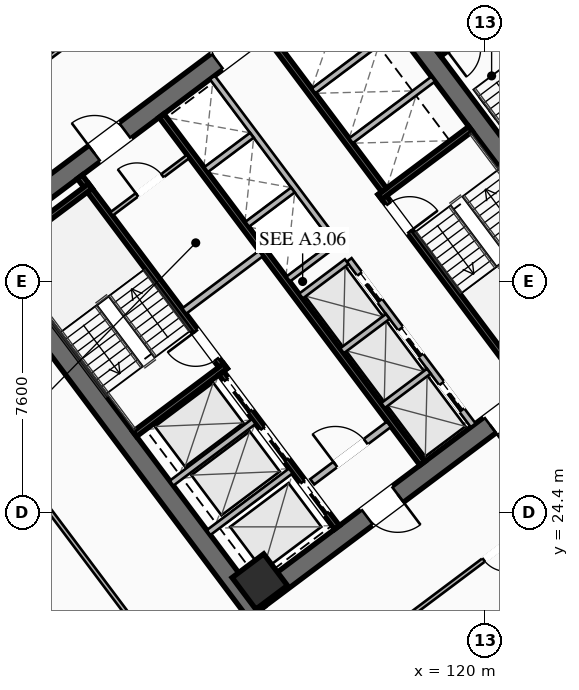
"""IFC4 building model, lengths in metres.
Left out: names, types, materials, properties, quantities, classifications, styles, units other than length and angle.
Written with IfcOpenShell. Run it as: python <this file> out.ifc"""

import sys

from ifc_helpers import new_model, si_unit, direction, frame, frame_2d, origin, origin_2d, place, context, subcontext, project, spatial, rectangle, hollow_rectangle, extrude, element, fill, save


model = new_model("IFC4")
c1 = context("Model", 3, precision=1e-05, world=origin(), true_north=direction((0.0, 1.0)))
c2 = subcontext(c1, "Body", "Model", "MODEL_VIEW")
j1 = project(units=[si_unit("LENGTHUNIT", "METRE"), si_unit("PLANEANGLEUNIT", "RADIAN")], contexts=[c1])
p1 = place(None, origin())
s1 = spatial("IfcSite", under=j1, at=p1, CompositionType="ELEMENT")
p2 = place(p1, origin())
s2 = spatial("IfcBuilding", under=s1, at=p2, CompositionType="ELEMENT")
p3 = place(p2, frame((0.0, 0.0, 63.65)))
s3 = spatial("IfcBuildingStorey", under=s2, at=p3, CompositionType="ELEMENT", Elevation=63.65)
for number, where, z_axis, x_axis in (
    (1, (112.476, 21.107, 0.0), (0.0, 0.0, 1.0), (-0.6, 0.8, 0.0)),
    (2, (115.524, 42.893, 0.0), (0.0, 0.0, 1.0), (0.6, -0.8, 0.0)),
):
    element("IfcWall", number, at=place(p3, frame(where, z_axis=z_axis, x_axis=x_axis)), inside=s3, PredefinedType="SHEAR", context=c2, shape_type="SweptSolid", body=[
        extrude(rectangle(XDim=15.6, YDim=0.65, at=frame_2d((7.8, 0.0))), origin(), (0.0, 0.0, 1.0), 3.55),
    ])
p4 = place(p3, frame((124.429, 30.478, 0.0), z_axis=(0.0, 0.0, 1.0), x_axis=(-0.799998028465, -0.600002628705, 0.0)))
e3 = element("IfcWall", 3, at=p4, inside=s3, PredefinedType="SHEAR", context=c2, shape_type="SweptSolid", body=[
    extrude(rectangle(XDim=14.86, YDim=0.65, at=frame_2d((7.43, 0.0))), origin(), (0.0, 0.0, 1.0), 3.55),
])
p5 = place(p4, frame((9.13, 0.0, 0.0)))
e4 = element("IfcOpeningElement", 4, at=p5, cuts=e3, PredefinedType="OPENING", context=c2, shape_type="SweptSolid", body=[
    extrude(rectangle(XDim=1.25, YDim=2.25, at=frame_2d((0.625, 1.125))), frame((0.0, 0.335, 0.0), z_axis=(0.0, -1.0, 0.0), x_axis=(1.0, 0.0, 0.0)), (0.0, 0.0, 1.0), 0.67),
])
p6 = place(p4, frame((4.08, 0.0, 0.0)))
e5 = element("IfcOpeningElement", 5, at=p6, cuts=e3, PredefinedType="OPENING", context=c2, shape_type="SweptSolid", body=[
    extrude(rectangle(XDim=1.25, YDim=2.25, at=frame_2d((0.625, 1.125))), frame((0.0, 0.335, 0.0), z_axis=(0.0, -1.0, 0.0), x_axis=(1.0, 0.0, 0.0)), (0.0, 0.0, 1.0), 0.67),
])
p7 = place(p3, frame((103.571, 33.522, 0.0), z_axis=(0.0, 0.0, 1.0), x_axis=(0.799998028465, 0.600002628705, 0.0)))
e6 = element("IfcWall", 6, at=p7, inside=s3, PredefinedType="SHEAR", context=c2, shape_type="SweptSolid", body=[
    extrude(rectangle(XDim=14.86, YDim=0.65, at=frame_2d((7.43, 0.0))), origin(), (0.0, 0.0, 1.0), 3.55),
])
p8 = place(p7, frame((4.48, 0.0, 0.0)))
e7 = element("IfcOpeningElement", 7, at=p8, cuts=e6, PredefinedType="OPENING", context=c2, shape_type="SweptSolid", body=[
    extrude(rectangle(XDim=1.25, YDim=2.25, at=frame_2d((0.625, 1.125))), frame((0.0, 0.335, 0.0), z_axis=(0.0, -1.0, 0.0), x_axis=(1.0, 0.0, 0.0)), (0.0, 0.0, 1.0), 0.67),
])
p9 = place(p7, frame((9.53, 0.0, 0.0)))
e8 = element("IfcOpeningElement", 8, at=p9, cuts=e6, PredefinedType="OPENING", context=c2, shape_type="SweptSolid", body=[
    extrude(rectangle(XDim=1.25, YDim=2.25, at=frame_2d((0.625, 1.125))), frame((0.0, 0.335, 0.0), z_axis=(0.0, -1.0, 0.0), x_axis=(1.0, 0.0, 0.0)), (0.0, 0.0, 1.0), 0.67),
])
p10 = place(p3, frame((112.59, 22.13, 0.0), z_axis=(0.0, 0.0, 1.0), x_axis=(0.799999996291, 0.600000004945, 0.0)))
e9 = element("IfcColumn", 9, at=p10, inside=s3, PredefinedType="COLUMN", context=c2, shape_type="SweptSolid", body=[
    extrude(hollow_rectangle(XDim=1.3, YDim=1.3, WallThickness=0.05, at=origin_2d()), origin(), (0.0, 0.0, 1.0), 3.35),
])
p11 = place(p3, frame((111.44, 29.08, 0.0), z_axis=(0.0, 0.0, 1.0), x_axis=(-0.600009827119, 0.799992629566, 0.0)))
e10 = element("IfcWall", 10, at=p11, inside=s3, PredefinedType="SHEAR", context=c2, shape_type="SweptSolid", body=[
    extrude(rectangle(XDim=7.95, YDim=0.2, at=frame_2d((3.975, 0.0))), origin(), (0.0, 0.0, 1.0), 3.35),
])
p12 = place(p11, frame((0.45, 0.0, 0.0)))
e11 = element("IfcOpeningElement", 11, at=p12, cuts=e10, PredefinedType="OPENING", context=c2, shape_type="SweptSolid", body=[
    extrude(rectangle(XDim=1.15, YDim=2.2, at=frame_2d((0.575, 1.1))), frame((0.0, 0.11, 0.0), z_axis=(0.0, -1.0, 0.0), x_axis=(1.0, 0.0, 0.0)), (0.0, 0.0, 1.0), 0.22),
])
for number, where, z_axis, x_axis in (
    (12, (108.476, 26.982, 0.0), (0.0, 0.0, 1.0), (0.8, 0.6, 0.0)),
    (13, (104.036, 32.902, 0.0), (0.0, 0.0, 1.0), (0.8, 0.6, 0.0)),
):
    element("IfcWall", number, at=place(p3, frame(where, z_axis=z_axis, x_axis=x_axis)), inside=s3, PredefinedType="SHEAR", context=c2, shape_type="SweptSolid", body=[
        extrude(rectangle(XDim=3.73, YDim=0.2, at=frame_2d((1.865, 0.0))), origin(), (0.0, 0.0, 1.0), 3.35),
    ])
p13 = place(p3, frame((116.56, 34.92, 0.0), z_axis=(0.0, 0.0, 1.0), x_axis=(0.600009827119, -0.799992629566, 0.0)))
e14 = element("IfcWall", 14, at=p13, inside=s3, PredefinedType="SHEAR", context=c2, shape_type="SweptSolid", body=[
    extrude(rectangle(XDim=7.95, YDim=0.2, at=frame_2d((3.975, 0.0))), origin(), (0.0, 0.0, 1.0), 3.35),
])
p14 = place(p13, frame((0.45, 0.0, 0.0)))
e15 = element("IfcOpeningElement", 15, at=p14, cuts=e14, PredefinedType="OPENING", context=c2, shape_type="SweptSolid", body=[
    extrude(rectangle(XDim=1.15, YDim=2.2, at=frame_2d((0.575, 1.1))), frame((0.0, 0.11, 0.0), z_axis=(0.0, -1.0, 0.0), x_axis=(1.0, 0.0, 0.0)), (0.0, 0.0, 1.0), 0.22),
])
p15 = place(p3, frame((116.54, 34.78, 0.0), z_axis=(0.0, 0.0, 1.0), x_axis=(0.799984290658, 0.600020945218, 0.0)))
e16 = element("IfcWall", 16, at=p15, inside=s3, PredefinedType="SHEAR", context=c2, shape_type="SweptSolid", body=[
    extrude(rectangle(XDim=3.73, YDim=0.2, at=frame_2d((1.865, 0.0))), origin(), (0.0, 0.0, 1.0), 3.35),
])
p16 = place(p3, frame((117.938, 26.016, 0.0), z_axis=(0.0, 0.0, 1.0), x_axis=(-0.600005463273, 0.799995902516, 0.0)))
e17 = element("IfcWall", 17, at=p16, inside=s3, PredefinedType="SHEAR", context=c2, shape_type="SweptSolid", body=[
    extrude(rectangle(XDim=14.3, YDim=0.2, at=frame_2d((7.15, 0.0))), origin(), (0.0, 0.0, 1.0), 3.35),
])
p17 = place(p3, frame((110.104, 31.028, 0.0), z_axis=(0.0, 0.0, 1.0), x_axis=(0.800018601094, 0.59997519774, 0.0)))
e18 = element("IfcWall", 18, at=p17, inside=s3, PredefinedType="SOLIDWALL", context=c2, shape_type="SweptSolid", body=[
    extrude(rectangle(XDim=3.15, YDim=0.22, at=frame_2d((1.575, 0.0))), origin(), (0.0, 0.0, 1.0), 2.493),
])
p18 = place(p3, frame((114.316, 25.412, 0.0), z_axis=(0.0, 0.0, 1.0), x_axis=(0.800018601094, 0.59997519774, 0.0)))
e19 = element("IfcWall", 19, at=p18, inside=s3, PredefinedType="SOLIDWALL", context=c2, shape_type="SweptSolid", body=[
    extrude(rectangle(XDim=3.15, YDim=0.22, at=frame_2d((1.575, 0.0))), origin(), (0.0, 0.0, 1.0), 2.493),
])
p19 = place(p18, frame((0.95, 0.0, 0.0)))
e20 = element("IfcOpeningElement", 20, at=p19, cuts=e19, PredefinedType="OPENING", context=c2, shape_type="SweptSolid", body=[
    extrude(rectangle(XDim=1.25, YDim=2.25, at=frame_2d((0.625, 1.125))), frame((0.0, 0.12, 0.0), z_axis=(0.0, -1.0, 0.0), x_axis=(1.0, 0.0, 0.0)), (0.0, 0.0, 1.0), 0.24),
])
p20 = place(p3, frame((115.13, 23.91, 0.0), z_axis=(0.0, 0.0, 1.0), x_axis=(-0.599975393228, 0.800018454488, 0.0)))
e21 = element("IfcWall", 21, at=p20, inside=s3, PredefinedType="SHEAR", context=c2, shape_type="SweptSolid", body=[
    extrude(rectangle(XDim=6.35, YDim=0.2, at=frame_2d((3.175, 0.0))), origin(), (0.0, 0.0, 1.0), 3.35),
])
p21 = place(p20, frame((4.775, 0.0, 0.0)))
e22 = element("IfcOpeningElement", 22, at=p21, cuts=e21, PredefinedType="OPENING", context=c2, shape_type="SweptSolid", body=[
    extrude(rectangle(XDim=1.3, YDim=2.25, at=frame_2d((0.65, 1.125))), frame((0.0, 0.11, 0.0), z_axis=(0.0, -1.0, 0.0), x_axis=(1.0, 0.0, 0.0)), (0.0, 0.0, 1.0), 0.22),
])
p22 = place(p20, frame((2.775, 0.0, 0.0)))
e23 = element("IfcOpeningElement", 23, at=p22, cuts=e21, PredefinedType="OPENING", context=c2, shape_type="SweptSolid", body=[
    extrude(rectangle(XDim=1.3, YDim=2.25, at=frame_2d((0.65, 1.125))), frame((0.0, 0.11, 0.0), z_axis=(0.0, -1.0, 0.0), x_axis=(1.0, 0.0, 0.0)), (0.0, 0.0, 1.0), 0.22),
])
p23 = place(p20, frame((0.575, 0.0, 0.0)))
e24 = element("IfcOpeningElement", 24, at=p23, cuts=e21, PredefinedType="OPENING", context=c2, shape_type="SweptSolid", body=[
    extrude(rectangle(XDim=1.3, YDim=2.25, at=frame_2d((0.65, 1.125))), frame((0.0, 0.11, 0.0), z_axis=(0.0, -1.0, 0.0), x_axis=(1.0, 0.0, 0.0)), (0.0, 0.0, 1.0), 0.22),
])
for number, where, z_axis, x_axis in (
    (25, (110.906, 23.742, 0.0), (0.0, 0.0, 1.0), (0.8, 0.6, 0.0)),
    (26, (109.688, 25.366, 0.0), (0.0, 0.0, 1.0), (0.8, 0.6, 0.0)),
):
    element("IfcWall", number, at=place(p3, frame(where, z_axis=z_axis, x_axis=x_axis)), inside=s3, PredefinedType="SOLIDWALL", context=c2, shape_type="SweptSolid", body=[
        extrude(rectangle(XDim=3.38, YDim=0.2, at=frame_2d((1.69, 0.0))), origin(), (0.0, 0.0, 1.0), 3.35),
    ])
p24 = place(p3, frame((112.87, 40.09, 0.0), z_axis=(0.0, 0.0, 1.0), x_axis=(0.599975393228, -0.800018454488, 0.0)))
e27 = element("IfcWall", 27, at=p24, inside=s3, PredefinedType="SHEAR", context=c2, shape_type="SweptSolid", body=[
    extrude(rectangle(XDim=6.35, YDim=0.2, at=frame_2d((3.175, 0.0))), origin(), (0.0, 0.0, 1.0), 3.35),
])
for number, where, z_axis, x_axis in (
    (28, (115.59, 36.63, 0.0), (0.0, 0.0, 1.0), (0.8, 0.6, 0.0)),
    (29, (114.36, 38.27, 0.0), (0.0, 0.0, 1.0), (0.8, 0.6, 0.0)),
):
    element("IfcWall", number, at=place(p3, frame(where, z_axis=z_axis, x_axis=x_axis)), inside=s3, PredefinedType="SOLIDWALL", context=c2, shape_type="SweptSolid", body=[
        extrude(rectangle(XDim=3.38, YDim=0.2, at=frame_2d((1.69, 0.0))), origin(), (0.0, 0.0, 1.0), 3.35),
    ])
p25 = place(p3, frame((107.71, 34.22, 0.0), z_axis=(0.0, 0.0, 1.0), x_axis=(0.799981399002, 0.60002480053, 0.0)))
e30 = element("IfcWall", 30, at=p25, inside=s3, PredefinedType="PARTITIONING", context=c2, shape_type="SweptSolid", body=[
    extrude(rectangle(XDim=3.15, YDim=0.135, at=frame_2d((1.575, 0.0))), origin(), (0.0, 0.0, 1.0), 2.493),
])
p26 = place(p25, frame((1.05, 0.0, 0.0)))
e31 = element("IfcOpeningElement", 31, at=p26, cuts=e30, PredefinedType="OPENING", context=c2, shape_type="SweptSolid", body=[
    extrude(rectangle(XDim=1.05, YDim=2.2, at=frame_2d((0.525, 1.1))), frame((0.0, 0.077, 0.0), z_axis=(0.0, -1.0, 0.0), x_axis=(1.0, 0.0, 0.0)), (0.0, 0.0, 1.0), 0.155),
])
p27 = place(p3, frame((119.61, 27.27, 0.0), z_axis=(0.0, 0.0, 1.0), x_axis=(-0.600011488909, 0.79999138319, 0.0)))
e32 = element("IfcWall", 32, at=p27, inside=s3, PredefinedType="SOLIDWALL", context=c2, shape_type="SweptSolid", body=[
    extrude(rectangle(XDim=6.8, YDim=0.2, at=frame_2d((3.4, 0.0))), origin(), (0.0, 0.0, 1.0), 3.35),
])
p28 = place(p27, frame((0.625, 0.0, 0.0)))
e33 = element("IfcOpeningElement", 33, at=p28, cuts=e32, PredefinedType="OPENING", context=c2, shape_type="SweptSolid", body=[
    extrude(rectangle(XDim=1.1, YDim=2.2, at=frame_2d((0.55, 1.1))), frame((0.0, 0.11, 0.0), z_axis=(0.0, -1.0, 0.0), x_axis=(1.0, 0.0, 0.0)), (0.0, 0.0, 1.0), 0.22),
])
p29 = place(p27, frame((2.875, 0.0, 0.0)))
e34 = element("IfcOpeningElement", 34, at=p29, cuts=e32, PredefinedType="OPENING", context=c2, shape_type="SweptSolid", body=[
    extrude(rectangle(XDim=1.1, YDim=2.2, at=frame_2d((0.55, 1.1))), frame((0.0, 0.11, 0.0), z_axis=(0.0, -1.0, 0.0), x_axis=(1.0, 0.0, 0.0)), (0.0, 0.0, 1.0), 0.22),
])
p30 = place(p27, frame((5.125, 0.0, 0.0)))
e35 = element("IfcOpeningElement", 35, at=p30, cuts=e32, PredefinedType="OPENING", context=c2, shape_type="SweptSolid", body=[
    extrude(rectangle(XDim=1.1, YDim=2.2, at=frame_2d((0.55, 1.1))), frame((0.0, 0.11, 0.0), z_axis=(0.0, -1.0, 0.0), x_axis=(1.0, 0.0, 0.0)), (0.0, 0.0, 1.0), 0.22),
])
p31 = place(p3, frame((116.646, 27.922, 0.0), z_axis=(0.0, 0.0, 1.0), x_axis=(0.8, 0.6, 0.0)))
e36 = element("IfcWall", 36, at=p31, inside=s3, PredefinedType="SOLIDWALL", context=c2, shape_type="SweptSolid", body=[
    extrude(rectangle(XDim=1.88, YDim=0.2, at=frame_2d((0.94, 0.0))), origin(), (0.0, 0.0, 1.0), 3.35),
])
p32 = place(p3, frame((115.296, 29.722, 0.0), z_axis=(0.0, 0.0, 1.0), x_axis=(0.799984418148, 0.600020775241, 0.0)))
e37 = element("IfcWall", 37, at=p32, inside=s3, PredefinedType="SOLIDWALL", context=c2, shape_type="SweptSolid", body=[
    extrude(rectangle(XDim=1.88, YDim=0.2, at=frame_2d((0.94, 0.0))), origin(), (0.0, 0.0, 1.0), 3.35),
])
p33 = place(p3, frame((113.946, 31.522, 0.0), z_axis=(0.0, 0.0, 1.0), x_axis=(0.8, 0.6, 0.0)))
e38 = element("IfcWall", 38, at=p33, inside=s3, PredefinedType="SOLIDWALL", context=c2, shape_type="SweptSolid", body=[
    extrude(rectangle(XDim=1.88, YDim=0.2, at=frame_2d((0.94, 0.0))), origin(), (0.0, 0.0, 1.0), 3.35),
])
p34 = place(p3, frame((115.11, 33.27, 0.0), z_axis=(0.0, 0.0, 1.0), x_axis=(-0.600011488909, 0.79999138319, 0.0)))
e39 = element("IfcWall", 39, at=p34, inside=s3, PredefinedType="SOLIDWALL", context=c2, shape_type="SweptSolid", body=[
    extrude(rectangle(XDim=6.8, YDim=0.2, at=frame_2d((3.4, 0.0))), origin(), (0.0, 0.0, 1.0), 3.35),
])
p35 = place(p3, frame((113.526, 32.082, 0.0), z_axis=(0.0, 0.0, 1.0), x_axis=(0.800046745961, 0.599937666993, 0.0)))
e40 = element("IfcWall", 40, at=p35, inside=s3, PredefinedType="SOLIDWALL", context=c2, shape_type="SweptSolid", body=[
    extrude(rectangle(XDim=1.88, YDim=0.2, at=frame_2d((0.94, 0.0))), origin(), (0.0, 0.0, 1.0), 3.35),
])
p36 = place(p3, frame((112.176, 33.882, 0.0), z_axis=(0.0, 0.0, 1.0), x_axis=(0.8, 0.6, 0.0)))
e41 = element("IfcWall", 41, at=p36, inside=s3, PredefinedType="SOLIDWALL", context=c2, shape_type="SweptSolid", body=[
    extrude(rectangle(XDim=1.88, YDim=0.2, at=frame_2d((0.94, 0.0))), origin(), (0.0, 0.0, 1.0), 3.35),
])
p37 = place(p3, frame((110.826, 35.682, 0.0), z_axis=(0.0, 0.0, 1.0), x_axis=(0.799984418148, 0.600020775241, 0.0)))
e42 = element("IfcWall", 42, at=p37, inside=s3, PredefinedType="SOLIDWALL", context=c2, shape_type="SweptSolid", body=[
    extrude(rectangle(XDim=1.88, YDim=0.2, at=frame_2d((0.94, 0.0))), origin(), (0.0, 0.0, 1.0), 3.35),
])
p38 = place(p3, frame((121.204, 41.528, 0.0), z_axis=(0.0, 0.0, 1.0), x_axis=(-0.800017232136, -0.599977023131, 0.0)))
e43 = element("IfcWall", 43, at=p38, inside=s3, PredefinedType="SHEAR", context=c2, shape_type="SweptSolid", body=[
    extrude(rectangle(XDim=3.4, YDim=0.2, at=frame_2d((1.7, 0.0))), origin(), (0.0, 0.0, 1.0), 3.35),
])
p39 = place(p38, frame((1.975, 0.0, 0.0)))
e44 = element("IfcOpeningElement", 44, at=p39, cuts=e43, PredefinedType="OPENING", context=c2, shape_type="SweptSolid", body=[
    extrude(rectangle(XDim=1.15, YDim=2.2, at=frame_2d((0.575, 1.1))), frame((0.0, 0.11, 0.0), z_axis=(0.0, -1.0, 0.0), x_axis=(1.0, 0.0, 0.0)), (0.0, 0.0, 1.0), 0.22),
])
p40 = place(p3, frame((98.516, 34.012, 0.0), z_axis=(0.0, 0.0, 1.0), x_axis=(0.799998035726, 0.600002619023, 0.0)))
e45 = element("IfcWall", 45, at=p40, inside=s3, PredefinedType="PARTITIONING", context=c2, shape_type="SweptSolid", body=[
    extrude(rectangle(XDim=29.83, YDim=0.135, at=frame_2d((14.915, 0.0))), origin(), (0.0, 0.0, 1.0), 2.493),
])
p41 = place(p40, frame((1.587, 0.0, 0.0)))
e46 = element("IfcOpeningElement", 46, at=p41, cuts=e45, PredefinedType="OPENING", context=c2, shape_type="SweptSolid", body=[
    extrude(rectangle(XDim=0.95, YDim=2.05, at=frame_2d((0.475, 1.025))), frame((0.0, 0.077, 0.0), z_axis=(0.0, -1.0, 0.0), x_axis=(1.0, 0.0, 0.0)), (0.0, 0.0, 1.0), 0.155),
])
p42 = place(p40, frame((28.58, 0.0, 0.0)))
e47 = element("IfcOpeningElement", 47, at=p42, cuts=e45, PredefinedType="OPENING", context=c2, shape_type="SweptSolid", body=[
    extrude(rectangle(XDim=0.95, YDim=2.05, at=frame_2d((0.475, 1.025))), frame((0.0, 0.077, 0.0), z_axis=(0.0, -1.0, 0.0), x_axis=(1.0, 0.0, 0.0)), (0.0, 0.0, 1.0), 0.155),
])
p43 = place(p3, frame((135.46, 34.47, 0.0), z_axis=(0.0, 0.0, 1.0), x_axis=(-0.800000982127, -0.599998690494, 0.0)))
e48 = element("IfcWall", 48, at=p43, inside=s3, PredefinedType="PARTITIONING", context=c2, shape_type="SweptSolid", body=[
    extrude(rectangle(XDim=29.83, YDim=0.135, at=frame_2d((14.915, 0.0))), origin(), (0.0, 0.0, 1.0), 2.493),
])
p44 = place(p43, frame((27.431, 0.0, 0.0)))
e49 = element("IfcOpeningElement", 49, at=p44, cuts=e48, PredefinedType="OPENING", context=c2, shape_type="SweptSolid", body=[
    extrude(rectangle(XDim=0.95, YDim=2.05, at=frame_2d((0.475, 1.025))), frame((0.0, 0.077, 0.0), z_axis=(0.0, -1.0, 0.0), x_axis=(1.0, 0.0, 0.0)), (0.0, 0.0, 1.0), 0.155),
])
p45 = place(p43, frame((18.43, 0.0, 0.0)))
e50 = element("IfcOpeningElement", 50, at=p45, cuts=e48, PredefinedType="OPENING", context=c2, shape_type="SweptSolid", body=[
    extrude(rectangle(XDim=0.95, YDim=2.05, at=frame_2d((0.475, 1.025))), frame((0.0, 0.077, 0.0), z_axis=(0.0, -1.0, 0.0), x_axis=(1.0, 0.0, 0.0)), (0.0, 0.0, 1.0), 0.155),
])
p46 = place(p43, frame((0.38, 0.0, 0.0)))
e51 = element("IfcOpeningElement", 51, at=p46, cuts=e48, PredefinedType="OPENING", context=c2, shape_type="SweptSolid", body=[
    extrude(rectangle(XDim=0.95, YDim=2.05, at=frame_2d((0.475, 1.025))), frame((0.0, 0.077, 0.0), z_axis=(0.0, -1.0, 0.0), x_axis=(1.0, 0.0, 0.0)), (0.0, 0.0, 1.0), 0.155),
])
p47 = place(p3, frame((111.548, 16.636, 0.0), z_axis=(0.0, 0.0, 1.0), x_axis=(-0.600003610192, 0.799997292343, 0.0)))
e52 = element("IfcWall", 52, at=p47, inside=s3, PredefinedType="PARTITIONING", context=c2, shape_type="SweptSolid", body=[
    extrude(rectangle(XDim=21.64, YDim=0.135, at=frame_2d((10.82, 0.0))), origin(), (0.0, 0.0, 1.0), 2.493),
])
p48 = place(p47, frame((10.596, 0.0, 0.0)))
e53 = element("IfcOpeningElement", 53, at=p48, cuts=e52, PredefinedType="OPENING", context=c2, shape_type="SweptSolid", body=[
    extrude(rectangle(XDim=0.95, YDim=2.05, at=frame_2d((0.475, 1.025))), frame((0.0, 0.077, 0.0), z_axis=(0.0, -1.0, 0.0), x_axis=(1.0, 0.0, 0.0)), (0.0, 0.0, 1.0), 0.155),
])
p49 = place(p8, origin())
e54 = element("IfcDoor", 54, at=p49, inside=s3, OperationType="SINGLE_SWING_LEFT", PredefinedType="DOOR", context=c2, shape_type="SweptSolid", body=[
    extrude(rectangle(XDim=1.25, YDim=2.25, at=frame_2d((0.625, 1.125))), frame((0.0, 0.025, 0.0), z_axis=(0.0, -1.0, 0.0), x_axis=(1.0, 0.0, 0.0)), (0.0, 0.0, 1.0), 0.05),
])
fill(e7, e54)
p50 = place(p9, origin())
e55 = element("IfcDoor", 55, at=p50, inside=s3, OperationType="SINGLE_SWING_RIGHT", PredefinedType="DOOR", context=c2, shape_type="SweptSolid", body=[
    extrude(rectangle(XDim=1.25, YDim=2.25, at=frame_2d((0.625, 1.125))), frame((0.0, 0.025, 0.0), z_axis=(0.0, -1.0, 0.0), x_axis=(1.0, 0.0, 0.0)), (0.0, 0.0, 1.0), 0.05),
])
fill(e8, e55)
p51 = place(p5, origin())
e56 = element("IfcDoor", 56, at=p51, inside=s3, OperationType="SINGLE_SWING_LEFT", PredefinedType="DOOR", context=c2, shape_type="SweptSolid", body=[
    extrude(rectangle(XDim=1.25, YDim=2.25, at=frame_2d((0.625, 1.125))), frame((0.0, 0.025, 0.0), z_axis=(0.0, -1.0, 0.0), x_axis=(1.0, 0.0, 0.0)), (0.0, 0.0, 1.0), 0.05),
])
fill(e4, e56)
p52 = place(p6, origin())
e57 = element("IfcDoor", 57, at=p52, inside=s3, OperationType="SINGLE_SWING_RIGHT", PredefinedType="DOOR", context=c2, shape_type="SweptSolid", body=[
    extrude(rectangle(XDim=1.25, YDim=2.25, at=frame_2d((0.625, 1.125))), frame((0.0, 0.025, 0.0), z_axis=(0.0, -1.0, 0.0), x_axis=(1.0, 0.0, 0.0)), (0.0, 0.0, 1.0), 0.05),
])
fill(e5, e57)
p53 = place(p12, origin())
e58 = element("IfcDoor", 58, at=p53, inside=s3, OperationType="SINGLE_SWING_RIGHT", PredefinedType="DOOR", context=c2, shape_type="SweptSolid", body=[
    extrude(rectangle(XDim=1.15, YDim=2.2, at=frame_2d((0.575, 1.1))), frame((0.0, 0.025, 0.0), z_axis=(0.0, -1.0, 0.0), x_axis=(1.0, 0.0, 0.0)), (0.0, 0.0, 1.0), 0.05),
])
fill(e11, e58)
p54 = place(p14, origin())
e59 = element("IfcDoor", 59, at=p54, inside=s3, OperationType="SINGLE_SWING_RIGHT", PredefinedType="DOOR", context=c2, shape_type="SweptSolid", body=[
    extrude(rectangle(XDim=1.15, YDim=2.2, at=frame_2d((0.575, 1.1))), frame((0.0, 0.025, 0.0), z_axis=(0.0, -1.0, 0.0), x_axis=(1.0, 0.0, 0.0)), (0.0, 0.0, 1.0), 0.05),
])
fill(e15, e59)
p55 = place(p19, origin())
e60 = element("IfcDoor", 60, at=p55, inside=s3, OperationType="SINGLE_SWING_LEFT", PredefinedType="DOOR", context=c2, shape_type="SweptSolid", body=[
    extrude(rectangle(XDim=1.25, YDim=2.25, at=frame_2d((0.625, 1.125))), frame((0.0, 0.025, 0.0), z_axis=(0.0, -1.0, 0.0), x_axis=(1.0, 0.0, 0.0)), (0.0, 0.0, 1.0), 0.05),
])
fill(e20, e60)
p56 = place(p26, origin())
e61 = element("IfcDoor", 61, at=p56, inside=s3, OperationType="SINGLE_SWING_LEFT", PredefinedType="DOOR", context=c2, shape_type="SweptSolid", body=[
    extrude(rectangle(XDim=1.05, YDim=2.2, at=frame_2d((0.525, 1.1))), frame((0.0, 0.025, 0.0), z_axis=(0.0, -1.0, 0.0), x_axis=(1.0, 0.0, 0.0)), (0.0, 0.0, 1.0), 0.05),
])
fill(e31, e61)
p57 = place(p45, origin())
e62 = element("IfcDoor", 62, at=p57, inside=s3, OperationType="SINGLE_SWING_LEFT", PredefinedType="DOOR", context=c2, shape_type="SweptSolid", body=[
    extrude(rectangle(XDim=0.95, YDim=2.05, at=frame_2d((0.475, 1.025))), frame((0.0, 0.025, 0.0), z_axis=(0.0, -1.0, 0.0), x_axis=(1.0, 0.0, 0.0)), (0.0, 0.0, 1.0), 0.05),
])
fill(e50, e62)
p58 = place(p21, origin())
e63 = element("IfcDoor", 63, at=p58, inside=s3, OperationType="SLIDING_TO_LEFT", PredefinedType="DOOR", context=c2, shape_type="SweptSolid", body=[
    extrude(rectangle(XDim=1.3, YDim=2.25, at=frame_2d((0.65, 1.125))), frame((0.0, 0.025, 0.0), z_axis=(0.0, -1.0, 0.0), x_axis=(1.0, 0.0, 0.0)), (0.0, 0.0, 1.0), 0.05),
])
fill(e22, e63)
p59 = place(p22, origin())
e64 = element("IfcDoor", 64, at=p59, inside=s3, OperationType="SLIDING_TO_LEFT", PredefinedType="DOOR", context=c2, shape_type="SweptSolid", body=[
    extrude(rectangle(XDim=1.3, YDim=2.25, at=frame_2d((0.65, 1.125))), frame((0.0, 0.025, 0.0), z_axis=(0.0, -1.0, 0.0), x_axis=(1.0, 0.0, 0.0)), (0.0, 0.0, 1.0), 0.05),
])
fill(e23, e64)
p60 = place(p23, origin())
e65 = element("IfcDoor", 65, at=p60, inside=s3, OperationType="SLIDING_TO_LEFT", PredefinedType="DOOR", context=c2, shape_type="SweptSolid", body=[
    extrude(rectangle(XDim=1.3, YDim=2.25, at=frame_2d((0.65, 1.125))), frame((0.0, 0.025, 0.0), z_axis=(0.0, -1.0, 0.0), x_axis=(1.0, 0.0, 0.0)), (0.0, 0.0, 1.0), 0.05),
])
fill(e24, e65)
p61 = place(p28, origin())
e66 = element("IfcDoor", 66, at=p61, inside=s3, OperationType="SLIDING_TO_LEFT", PredefinedType="DOOR", context=c2, shape_type="SweptSolid", body=[
    extrude(rectangle(XDim=1.1, YDim=2.2, at=frame_2d((0.55, 1.1))), frame((0.0, 0.025, 0.0), z_axis=(0.0, -1.0, 0.0), x_axis=(1.0, 0.0, 0.0)), (0.0, 0.0, 1.0), 0.05),
])
fill(e33, e66)
p62 = place(p29, origin())
e67 = element("IfcDoor", 67, at=p62, inside=s3, OperationType="SLIDING_TO_LEFT", PredefinedType="DOOR", context=c2, shape_type="SweptSolid", body=[
    extrude(rectangle(XDim=1.1, YDim=2.2, at=frame_2d((0.55, 1.1))), frame((0.0, 0.025, 0.0), z_axis=(0.0, -1.0, 0.0), x_axis=(1.0, 0.0, 0.0)), (0.0, 0.0, 1.0), 0.05),
])
fill(e34, e67)
p63 = place(p30, origin())
e68 = element("IfcDoor", 68, at=p63, inside=s3, OperationType="SLIDING_TO_LEFT", PredefinedType="DOOR", context=c2, shape_type="SweptSolid", body=[
    extrude(rectangle(XDim=1.1, YDim=2.2, at=frame_2d((0.55, 1.1))), frame((0.0, 0.025, 0.0), z_axis=(0.0, -1.0, 0.0), x_axis=(1.0, 0.0, 0.0)), (0.0, 0.0, 1.0), 0.05),
])
fill(e35, e68)
save(model, sys.argv[1])
